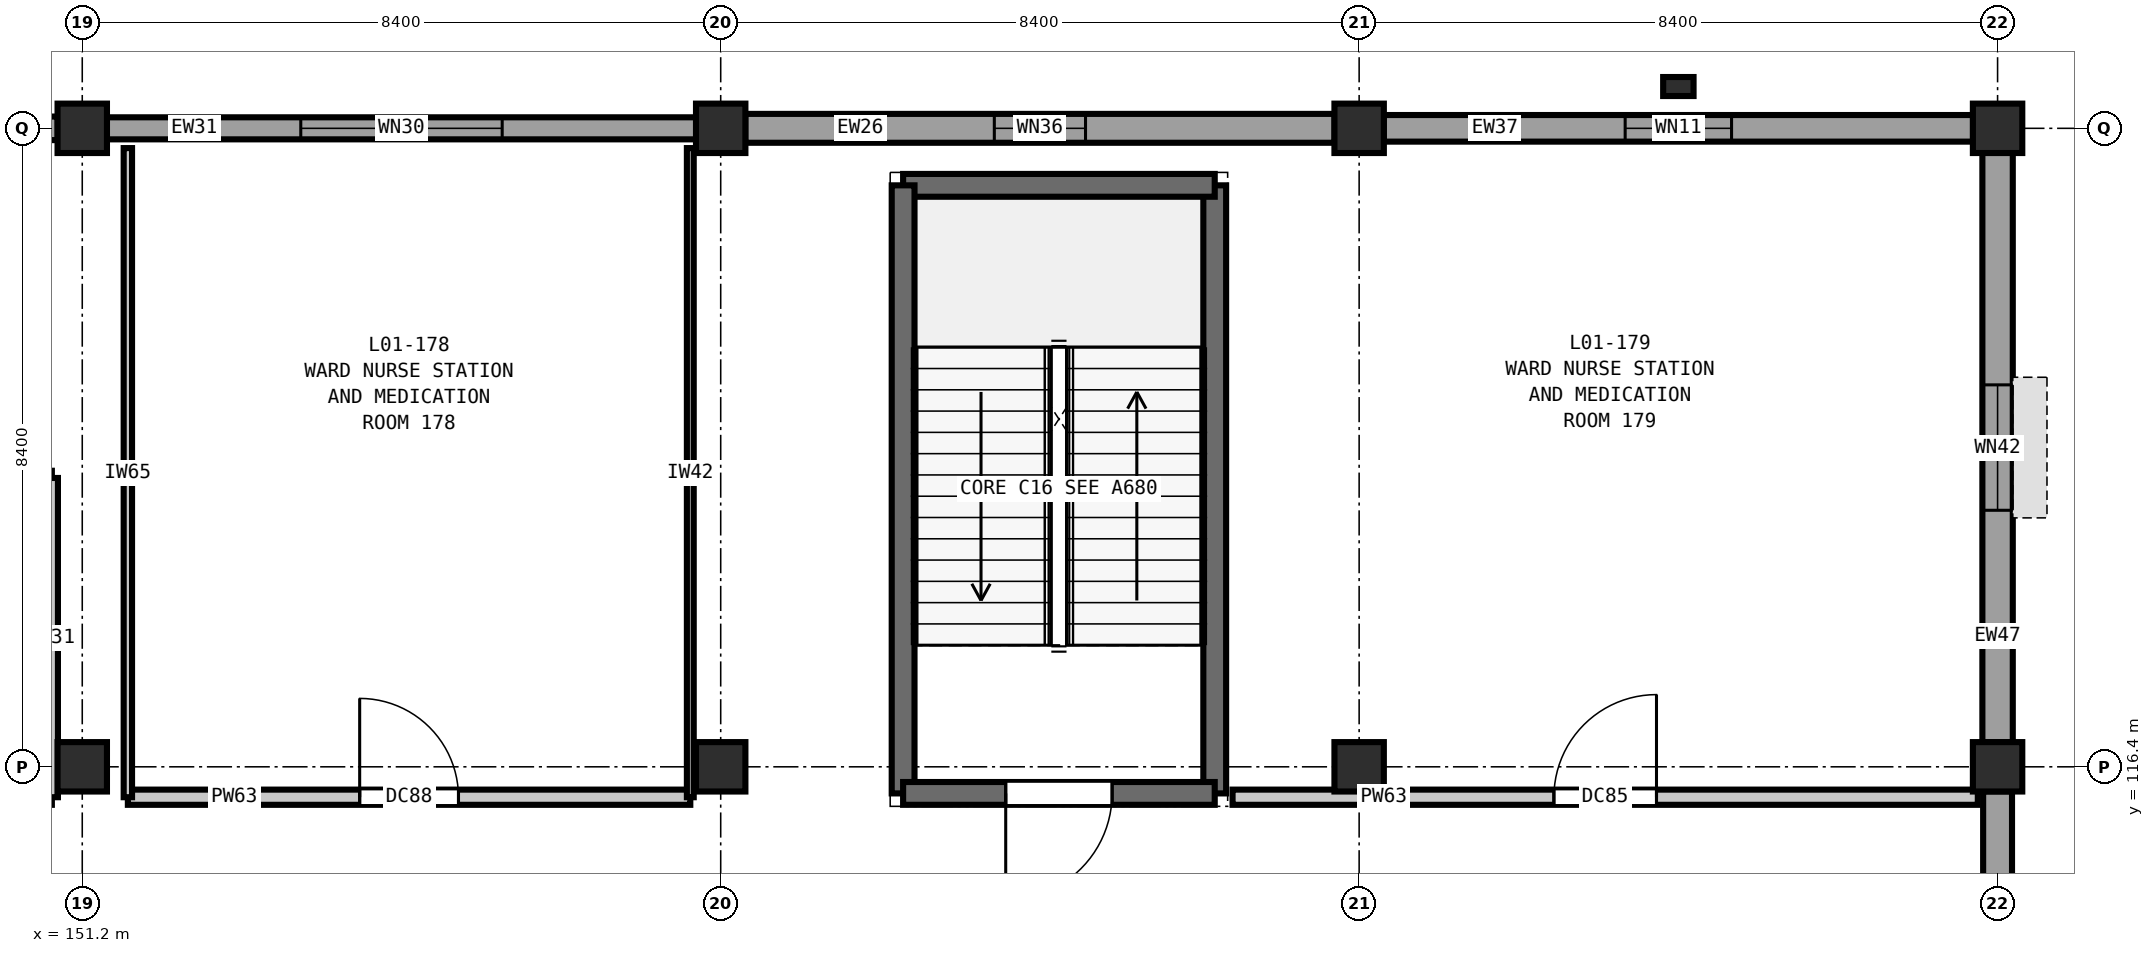
"""IFC4 building model, lengths in metres.
Left out: names, types, materials, properties, quantities, classifications, styles, units other than length and angle.
Written with IfcOpenShell. Run it as: python <this file> out.ifc"""

import sys

from ifc_helpers import new_model, si_unit, direction, frame, frame_2d, origin, origin_2d, place, context, subcontext, project, spatial, rectangle, extrude, element, fill, save


model = new_model("IFC4")
c1 = context("Model", 3, precision=1e-05, world=origin(), true_north=direction((0.0, 1.0)))
c2 = subcontext(c1, "Body", "Model", "MODEL_VIEW")
j1 = project(units=[si_unit("LENGTHUNIT", "METRE"), si_unit("PLANEANGLEUNIT", "RADIAN")], contexts=[c1])
p1 = place(None, origin())
s1 = spatial("IfcSite", under=j1, at=p1, CompositionType="ELEMENT")
p2 = place(p1, origin())
s2 = spatial("IfcBuilding", under=s1, at=p2, CompositionType="ELEMENT")
p3 = place(p2, frame((0.0, 0.0, 5.4)))
s3 = spatial("IfcBuildingStorey", under=s2, at=p3, CompositionType="ELEMENT", Elevation=5.4)
for number, where, z_axis, x_axis in (
    (1, (151.2, 116.4, 0.0), (0.0, 0.0, 1.0), (1.0, 0.0, 0.0)),
    (2, (151.2, 124.8, 0.0), (0.0, 0.0, 1.0), (1.0, 0.0, 0.0)),
    (3, (159.6, 116.4, 0.0), (0.0, 0.0, 1.0), (1.0, 0.0, 0.0)),
    (4, (159.6, 124.8, 0.0), (0.0, 0.0, 1.0), (1.0, 0.0, 0.0)),
    (5, (168.0, 116.4, 0.0), (0.0, 0.0, 1.0), (1.0, 0.0, 0.0)),
    (6, (168.0, 124.8, 0.0), (0.0, 0.0, 1.0), (1.0, 0.0, 0.0)),
    (7, (176.4, 116.4, 0.0), (0.0, 0.0, 1.0), (1.0, 0.0, 0.0)),
    (8, (176.4, 124.8, 0.0), (0.0, 0.0, 1.0), (1.0, 0.0, 0.0)),
):
    element("IfcColumn", number, at=place(p3, frame(where, z_axis=z_axis, x_axis=x_axis)), inside=s3, PredefinedType="COLUMN", context=c2, shape_type="SweptSolid", body=[
        extrude(rectangle(XDim=0.65, YDim=0.65, at=origin_2d()), origin(), (0.0, 0.0, 1.0), 5.4),
    ])
p4 = place(p3, frame((172.2, 125.35, 0.0), z_axis=(0.0, 0.0, 1.0), x_axis=(1.0, 0.0, 0.0)))
e9 = element("IfcColumn", 9, at=p4, inside=s3, PredefinedType="PILASTER", context=c2, shape_type="SweptSolid", body=[
    extrude(rectangle(XDim=0.4, YDim=0.25, at=origin_2d()), origin(), (0.0, 0.0, 1.0), 5.4),
])
p5 = place(p3, frame((143.123, 124.8, 0.0), z_axis=(0.0, 0.0, 1.0), x_axis=(1.0, 0.0, 0.0)))
e10 = element("IfcWall", 10, at=p5, inside=s3, PredefinedType="SOLIDWALL", context=c2, shape_type="SweptSolid", body=[
    extrude(rectangle(XDim=7.754, YDim=0.31, at=frame_2d((3.877, 0.0))), origin(), (0.0, 0.0, 1.0), 4.68),
])
p6 = place(p5, frame((2.677, 0.0, 0.9)))
e11 = element("IfcOpeningElement", 11, at=p6, cuts=e10, PredefinedType="OPENING", context=c2, shape_type="SweptSolid", body=[
    extrude(rectangle(XDim=2.4, YDim=1.95, at=frame_2d((1.2, 0.975))), frame((0.0, 0.165, 0.0), z_axis=(0.0, -1.0, 0.0), x_axis=(1.0, 0.0, 0.0)), (0.0, 0.0, 1.0), 0.33),
])
p7 = place(p3, frame((151.523, 124.8, 0.0), z_axis=(0.0, 0.0, 1.0), x_axis=(1.0, 0.0, 0.0)))
e12 = element("IfcWall", 12, at=p7, inside=s3, PredefinedType="SOLIDWALL", context=c2, shape_type="SweptSolid", body=[
    extrude(rectangle(XDim=7.754, YDim=0.29, at=frame_2d((3.877, 0.0))), origin(), (0.0, 0.0, 1.0), 4.68),
])
p8 = place(p7, frame((2.552, 0.0, 0.9)))
e13 = element("IfcOpeningElement", 13, at=p8, cuts=e12, PredefinedType="OPENING", context=c2, shape_type="SweptSolid", body=[
    extrude(rectangle(XDim=2.65, YDim=1.95, at=frame_2d((1.325, 0.975))), frame((0.0, 0.155, 0.0), z_axis=(0.0, -1.0, 0.0), x_axis=(1.0, 0.0, 0.0)), (0.0, 0.0, 1.0), 0.31),
])
p9 = place(p3, frame((159.923, 124.8, 0.0), z_axis=(0.0, 0.0, 1.0), x_axis=(1.0, 0.0, 0.0)))
e14 = element("IfcWall", 14, at=p9, inside=s3, PredefinedType="SOLIDWALL", context=c2, shape_type="SweptSolid", body=[
    extrude(rectangle(XDim=7.754, YDim=0.38, at=frame_2d((3.877, 0.0))), origin(), (0.0, 0.0, 1.0), 4.68),
])
p10 = place(p9, frame((3.277, 0.0, 0.9)))
e15 = element("IfcOpeningElement", 15, at=p10, cuts=e14, PredefinedType="OPENING", context=c2, shape_type="SweptSolid", body=[
    extrude(rectangle(XDim=1.2, YDim=2.15, at=frame_2d((0.6, 1.075))), frame((0.0, 0.2, 0.0), z_axis=(0.0, -1.0, 0.0), x_axis=(1.0, 0.0, 0.0)), (0.0, 0.0, 1.0), 0.4),
])
p11 = place(p3, frame((168.323, 124.8, 0.0), z_axis=(0.0, 0.0, 1.0), x_axis=(1.0, 0.0, 0.0)))
e16 = element("IfcWall", 16, at=p11, inside=s3, PredefinedType="SOLIDWALL", context=c2, shape_type="SweptSolid", body=[
    extrude(rectangle(XDim=7.754, YDim=0.35, at=frame_2d((3.877, 0.0))), origin(), (0.0, 0.0, 1.0), 4.68),
])
p12 = place(p11, frame((3.177, 0.0, 0.9)))
e17 = element("IfcOpeningElement", 17, at=p12, cuts=e16, PredefinedType="OPENING", context=c2, shape_type="SweptSolid", body=[
    extrude(rectangle(XDim=1.4, YDim=2.15, at=frame_2d((0.7, 1.075))), frame((0.0, 0.185, 0.0), z_axis=(0.0, -1.0, 0.0), x_axis=(1.0, 0.0, 0.0)), (0.0, 0.0, 1.0), 0.37),
])
p13 = place(p3, frame((176.4, 124.477, 0.0), z_axis=(0.0, 0.0, 1.0), x_axis=(0.0, -1.0, 0.0)))
e18 = element("IfcWall", 18, at=p13, inside=s3, PredefinedType="SOLIDWALL", context=c2, shape_type="SweptSolid", body=[
    extrude(rectangle(XDim=7.754, YDim=0.4, at=frame_2d((3.877, 0.0))), origin(), (0.0, 0.0, 1.0), 4.68),
])
p14 = place(p13, frame((3.052, 0.0, 0.9)))
e19 = element("IfcOpeningElement", 19, at=p14, cuts=e18, PredefinedType="OPENING", context=c2, shape_type="SweptSolid", body=[
    extrude(rectangle(XDim=1.65, YDim=2.15, at=frame_2d((0.825, 1.075))), frame((0.0, 0.21, 0.0), z_axis=(0.0, -1.0, 0.0), x_axis=(1.0, 0.0, 0.0)), (0.0, 0.0, 1.0), 0.42),
])
p15 = place(p3, frame((176.4, 116.077, 0.0), z_axis=(0.0, 0.0, 1.0), x_axis=(0.0, -1.0, 0.0)))
e20 = element("IfcWall", 20, at=p15, inside=s3, PredefinedType="SOLIDWALL", context=c2, shape_type="SweptSolid", body=[
    extrude(rectangle(XDim=6.554, YDim=0.38, at=frame_2d((3.277, 0.0))), origin(), (0.0, 0.0, 1.0), 4.68),
])
p16 = place(p3, frame((166.1, 116.05, 0.0), z_axis=(0.0, 0.0, 1.0), x_axis=(0.0, 1.0, 0.0)))
e21 = element("IfcWall", 21, at=p16, inside=s3, PredefinedType="SHEAR", context=c2, shape_type="SweptSolid", body=[
    extrude(rectangle(XDim=8.0, YDim=0.3, at=frame_2d((4.0, 0.0))), origin(), (0.0, 0.0, 1.0), 5.4),
])
p17 = place(p3, frame((166.1, 124.05, 0.0), z_axis=(0.0, 0.0, 1.0), x_axis=(-1.0, 0.0, 0.0)))
e22 = element("IfcWall", 22, at=p17, inside=s3, PredefinedType="SHEAR", context=c2, shape_type="SweptSolid", body=[
    extrude(rectangle(XDim=4.1, YDim=0.3, at=frame_2d((2.05, 0.0))), origin(), (0.0, 0.0, 1.0), 5.4),
])
p18 = place(p3, frame((162.0, 124.05, 0.0), z_axis=(0.0, 0.0, 1.0), x_axis=(0.0, -1.0, 0.0)))
e23 = element("IfcWall", 23, at=p18, inside=s3, PredefinedType="SHEAR", context=c2, shape_type="SweptSolid", body=[
    extrude(rectangle(XDim=8.0, YDim=0.3, at=frame_2d((4.0, 0.0))), origin(), (0.0, 0.0, 1.0), 5.4),
])
p19 = place(p3, frame((162.0, 116.05, 0.0), z_axis=(0.0, 0.0, 1.0), x_axis=(1.0, 0.0, 0.0)))
e24 = element("IfcWall", 24, at=p19, inside=s3, PredefinedType="SHEAR", context=c2, shape_type="SweptSolid", body=[
    extrude(rectangle(XDim=4.1, YDim=0.3, at=frame_2d((2.05, 0.0))), origin(), (0.0, 0.0, 1.0), 5.4),
])
p20 = place(p19, frame((1.35, 0.0, 0.0)))
e25 = element("IfcOpeningElement", 25, at=p20, cuts=e24, PredefinedType="OPENING", context=c2, shape_type="SweptSolid", body=[
    extrude(rectangle(XDim=1.4, YDim=2.2, at=frame_2d((0.7, 1.1))), frame((0.0, 0.16, 0.0), z_axis=(0.0, -1.0, 0.0), x_axis=(1.0, 0.0, 0.0)), (0.0, 0.0, 1.0), 0.32),
])
p21 = place(p3, frame((151.8, 116.0, 0.0), z_axis=(0.0, 0.0, 1.0), x_axis=(1.0, 0.0, 0.0)))
e26 = element("IfcWall", 26, at=p21, inside=s3, PredefinedType="PARTITIONING", context=c2, shape_type="SweptSolid", body=[
    extrude(rectangle(XDim=7.4, YDim=0.2, at=frame_2d((3.7, 0.0))), origin(), (0.0, 0.0, 1.0), 5.05),
])
p22 = place(p21, frame((3.05, 0.0, 0.0)))
e27 = element("IfcOpeningElement", 27, at=p22, cuts=e26, PredefinedType="OPENING", context=c2, shape_type="SweptSolid", body=[
    extrude(rectangle(XDim=1.3, YDim=2.2, at=frame_2d((0.65, 1.1))), frame((0.0, 0.11, 0.0), z_axis=(0.0, -1.0, 0.0), x_axis=(1.0, 0.0, 0.0)), (0.0, 0.0, 1.0), 0.22),
])
p23 = place(p3, frame((166.335, 116.0, 0.0), z_axis=(0.0, 0.0, 1.0), x_axis=(1.0, 0.0, 0.0)))
e28 = element("IfcWall", 28, at=p23, inside=s3, PredefinedType="PARTITIONING", context=c2, shape_type="SweptSolid", body=[
    extrude(rectangle(XDim=9.805, YDim=0.2, at=frame_2d((4.903, 0.0))), origin(), (0.0, 0.0, 1.0), 5.05),
])
p24 = place(p23, frame((4.228, 0.0, 0.0)))
e29 = element("IfcOpeningElement", 29, at=p24, cuts=e28, PredefinedType="OPENING", context=c2, shape_type="SweptSolid", body=[
    extrude(rectangle(XDim=1.35, YDim=2.2, at=frame_2d((0.675, 1.1))), frame((0.0, 0.11, 0.0), z_axis=(0.0, -1.0, 0.0), x_axis=(1.0, 0.0, 0.0)), (0.0, 0.0, 1.0), 0.22),
])
p25 = place(p3, frame((150.8, 116.0, 0.0), z_axis=(0.0, 0.0, 1.0), x_axis=(0.0, 1.0, 0.0)))
e30 = element("IfcWall", 30, at=p25, inside=s3, PredefinedType="PLUMBINGWALL", context=c2, shape_type="SweptSolid", body=[
    extrude(rectangle(XDim=4.2, YDim=0.16, at=frame_2d((2.1, 0.0))), origin(), (0.0, 0.0, 1.0), 5.05),
])
p26 = place(p3, frame((151.8, 116.0, 0.0), z_axis=(0.0, 0.0, 1.0), x_axis=(0.0, 1.0, 0.0)))
e31 = element("IfcWall", 31, at=p26, inside=s3, PredefinedType="PARTITIONING", context=c2, shape_type="SweptSolid", body=[
    extrude(rectangle(XDim=8.54, YDim=0.11, at=frame_2d((4.27, 0.0))), origin(), (0.0, 0.0, 1.0), 5.05),
])
p27 = place(p3, frame((159.2, 116.0, 0.0), z_axis=(0.0, 0.0, 1.0), x_axis=(0.0, 1.0, 0.0)))
e32 = element("IfcWall", 32, at=p27, inside=s3, PredefinedType="PARTITIONING", context=c2, shape_type="SweptSolid", body=[
    extrude(rectangle(XDim=8.54, YDim=0.09, at=frame_2d((4.27, 0.0))), origin(), (0.0, 0.0, 1.0), 5.05),
])
p28 = place(p8, origin())
e33 = element("IfcWindow", 33, at=p28, inside=s3, PartitioningType="DOUBLE_PANEL_VERTICAL", PredefinedType="WINDOW", context=c2, shape_type="SweptSolid", body=[
    extrude(rectangle(XDim=2.65, YDim=1.95, at=frame_2d((1.325, 0.975))), frame((0.0, 0.03, 0.0), z_axis=(0.0, -1.0, 0.0), x_axis=(1.0, 0.0, 0.0)), (0.0, 0.0, 1.0), 0.06),
])
fill(e13, e33)
p29 = place(p10, origin())
e34 = element("IfcWindow", 34, at=p29, inside=s3, PartitioningType="SINGLE_PANEL", PredefinedType="WINDOW", context=c2, shape_type="SweptSolid", body=[
    extrude(rectangle(XDim=1.2, YDim=2.15, at=frame_2d((0.6, 1.075))), frame((0.0, 0.03, 0.0), z_axis=(0.0, -1.0, 0.0), x_axis=(1.0, 0.0, 0.0)), (0.0, 0.0, 1.0), 0.06),
])
fill(e15, e34)
p30 = place(p12, origin())
e35 = element("IfcWindow", 35, at=p30, inside=s3, PartitioningType="SINGLE_PANEL", PredefinedType="WINDOW", context=c2, shape_type="SweptSolid", body=[
    extrude(rectangle(XDim=1.4, YDim=2.15, at=frame_2d((0.7, 1.075))), frame((0.0, 0.03, 0.0), z_axis=(0.0, -1.0, 0.0), x_axis=(1.0, 0.0, 0.0)), (0.0, 0.0, 1.0), 0.06),
])
fill(e17, e35)
p31 = place(p14, origin())
e36 = element("IfcWindow", 36, at=p31, inside=s3, PartitioningType="DOUBLE_PANEL_VERTICAL", PredefinedType="WINDOW", context=c2, shape_type="SweptSolid", body=[
    extrude(rectangle(XDim=1.65, YDim=2.15, at=frame_2d((0.825, 1.075))), frame((0.0, 0.03, 0.0), z_axis=(0.0, -1.0, 0.0), x_axis=(1.0, 0.0, 0.0)), (0.0, 0.0, 1.0), 0.06),
])
fill(e19, e36)
p32 = place(p20, frame((1.4, 0.0, 0.0), z_axis=(0.0, 0.0, 1.0), x_axis=(-1.0, 0.0, 0.0)))
e37 = element("IfcDoor", 37, at=p32, inside=s3, OperationType="SINGLE_SWING_RIGHT", PredefinedType="DOOR", context=c2, shape_type="SweptSolid", body=[
    extrude(rectangle(XDim=1.4, YDim=2.2, at=frame_2d((0.7, 1.1))), frame((0.0, 0.025, 0.0), z_axis=(0.0, -1.0, 0.0), x_axis=(1.0, 0.0, 0.0)), (0.0, 0.0, 1.0), 0.05),
])
fill(e25, e37)
p33 = place(p22, origin())
e38 = element("IfcDoor", 38, at=p33, inside=s3, OperationType="SINGLE_SWING_LEFT", PredefinedType="DOOR", context=c2, shape_type="SweptSolid", body=[
    extrude(rectangle(XDim=1.3, YDim=2.2, at=frame_2d((0.65, 1.1))), frame((0.0, 0.025, 0.0), z_axis=(0.0, -1.0, 0.0), x_axis=(1.0, 0.0, 0.0)), (0.0, 0.0, 1.0), 0.05),
])
fill(e27, e38)
p34 = place(p24, origin())
e39 = element("IfcDoor", 39, at=p34, inside=s3, OperationType="SINGLE_SWING_RIGHT", PredefinedType="DOOR", context=c2, shape_type="SweptSolid", body=[
    extrude(rectangle(XDim=1.35, YDim=2.2, at=frame_2d((0.675, 1.1))), frame((0.0, 0.025, 0.0), z_axis=(0.0, -1.0, 0.0), x_axis=(1.0, 0.0, 0.0)), (0.0, 0.0, 1.0), 0.05),
])
fill(e29, e39)
save(model, sys.argv[1])
